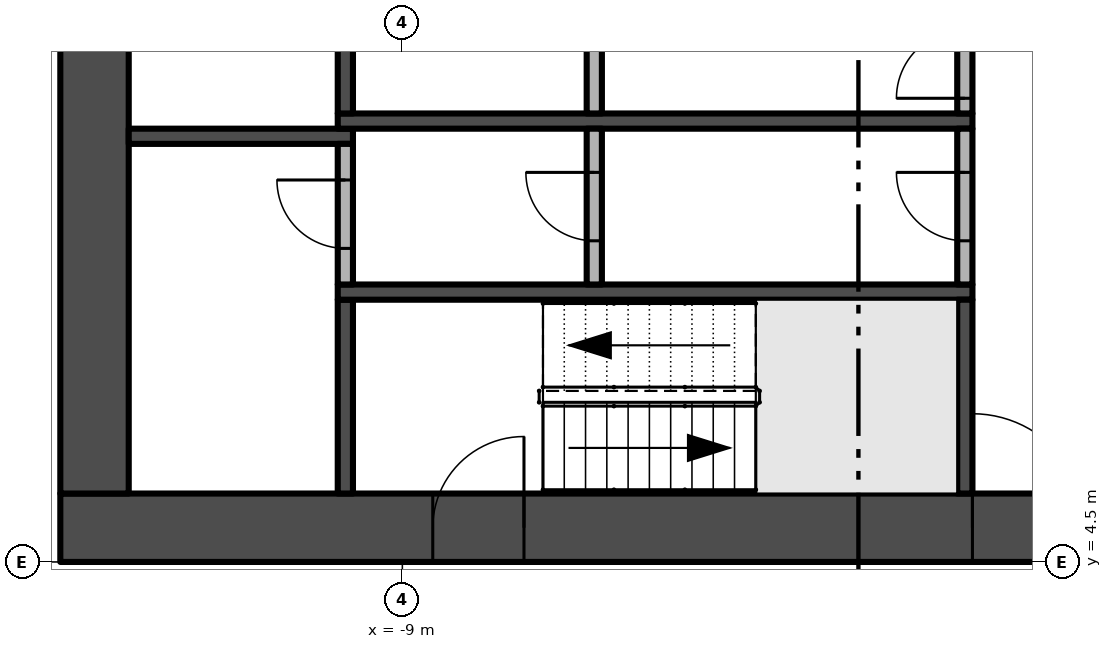
"""IFC4 building model, lengths in metres.
Left out: names, types, materials, properties, quantities, classifications, styles, units other than length and angle.
Written with IfcOpenShell. Run it as: python <this file> out.ifc"""

import sys

from ifc_helpers import new_model, si_unit, direction, frame, frame_2d, origin, place, context, subcontext, project, spatial, rectangle, extrude, element, fill, save


model = new_model("IFC4")
c1 = context("Model", 3, precision=1e-05, world=origin(), true_north=direction((0.0, 1.0)))
c2 = subcontext(c1, "Body", "Model", "MODEL_VIEW")
j1 = project(units=[si_unit("LENGTHUNIT", "METRE"), si_unit("PLANEANGLEUNIT", "RADIAN")], contexts=[c1])
p1 = place(None, origin())
s1 = spatial("IfcSite", under=j1, at=p1, CompositionType="ELEMENT")
p2 = place(p1, origin())
s2 = spatial("IfcBuilding", under=s1, at=p2, CompositionType="ELEMENT")
p3 = place(p2, frame((0.0, 0.0, 92.2)))
s3 = spatial("IfcBuildingStorey", under=s2, at=p3, CompositionType="ELEMENT", Elevation=92.2)
p4 = place(p3, frame((-13.5, 4.95, -0.3), z_axis=(0.0, 0.0, 1.0), x_axis=(1.0, 0.0, 0.0)))
e1 = element("IfcWall", 1, at=p4, inside=s3, PredefinedType="SHEAR", context=c2, shape_type="SweptSolid", body=[
    extrude(rectangle(XDim=27.0, YDim=0.9, at=frame_2d((13.5, 0.0))), origin(), (0.0, 0.0, 1.0), 3.8),
])
p5 = place(p4, frame((12.0, 0.0, 0.3)))
e2 = element("IfcOpeningElement", 2, at=p5, cuts=e1, PredefinedType="OPENING", context=c2, shape_type="SweptSolid", body=[
    extrude(rectangle(XDim=3.0, YDim=2.4, at=frame_2d((1.5, 1.2))), frame((0.0, 0.46, 0.0), z_axis=(0.0, -1.0, 0.0), x_axis=(1.0, 0.0, 0.0)), (0.0, 0.0, 1.0), 0.92),
])
p6 = place(p4, frame((4.9, 0.0, 0.3)))
e3 = element("IfcOpeningElement", 3, at=p6, cuts=e1, PredefinedType="OPENING", context=c2, shape_type="SweptSolid", body=[
    extrude(rectangle(XDim=1.2, YDim=2.2, at=frame_2d((0.6, 1.1))), frame((0.0, 0.46, 0.0), z_axis=(0.0, -1.0, 0.0), x_axis=(1.0, 0.0, 0.0)), (0.0, 0.0, 1.0), 0.92),
])
p7 = place(p4, frame((20.75, 0.0, 0.3)))
e4 = element("IfcOpeningElement", 4, at=p7, cuts=e1, PredefinedType="OPENING", context=c2, shape_type="SweptSolid", body=[
    extrude(rectangle(XDim=1.5, YDim=2.2, at=frame_2d((0.75, 1.1))), frame((0.0, 0.46, 0.0), z_axis=(0.0, -1.0, 0.0), x_axis=(1.0, 0.0, 0.0)), (0.0, 0.0, 1.0), 0.92),
])
p8 = place(p4, frame((17.4, 0.0, 0.3)))
e5 = element("IfcOpeningElement", 5, at=p8, cuts=e1, PredefinedType="OPENING", context=c2, shape_type="SweptSolid", body=[
    extrude(rectangle(XDim=1.2, YDim=2.2, at=frame_2d((0.6, 1.1))), frame((0.0, 0.46, 0.0), z_axis=(0.0, -1.0, 0.0), x_axis=(1.0, 0.0, 0.0)), (0.0, 0.0, 1.0), 0.92),
])
p9 = place(p3, frame((-13.05, 21.6, -0.3), z_axis=(0.0, 0.0, 1.0), x_axis=(0.0, -1.0, 0.0)))
e6 = element("IfcWall", 6, at=p9, inside=s3, PredefinedType="SHEAR", context=c2, shape_type="SweptSolid", body=[
    extrude(rectangle(XDim=16.2, YDim=0.9, at=frame_2d((8.1, 0.0))), origin(), (0.0, 0.0, 1.0), 3.8),
])
p10 = place(p9, frame((9.0, 0.0, 0.3)))
e7 = element("IfcOpeningElement", 7, at=p10, cuts=e6, PredefinedType="OPENING", context=c2, shape_type="SweptSolid", body=[
    extrude(rectangle(XDim=1.2, YDim=2.2, at=frame_2d((0.6, 1.1))), frame((0.0, 0.46, 0.0), z_axis=(0.0, -1.0, 0.0), x_axis=(1.0, 0.0, 0.0)), (0.0, 0.0, 1.0), 0.92),
])
p11 = place(p3, frame((-12.6, 10.1, 0.0), z_axis=(0.0, 0.0, 1.0), x_axis=(1.0, 0.0, 0.0)))
e8 = element("IfcWall", 8, at=p11, inside=s3, PredefinedType="SHEAR", context=c2, shape_type="SweptSolid", body=[
    extrude(rectangle(XDim=2.95, YDim=0.2, at=frame_2d((1.475, 0.0))), origin(), (0.0, 0.0, 1.0), 3.5),
])
p12 = place(p3, frame((-9.75, 5.4, 0.0), z_axis=(0.0, 0.0, 1.0), x_axis=(0.0, 1.0, 0.0)))
e9 = element("IfcWall", 9, at=p12, inside=s3, PredefinedType="SHEAR", context=c2, shape_type="SweptSolid", body=[
    extrude(rectangle(XDim=2.55, YDim=0.2, at=frame_2d((1.275, 0.0))), origin(), (0.0, 0.0, 1.0), 3.5),
])
p13 = place(p3, frame((-9.85, 8.05, 0.0), z_axis=(0.0, 0.0, 1.0), x_axis=(1.0, 0.0, 0.0)))
e10 = element("IfcWall", 10, at=p13, inside=s3, PredefinedType="SHEAR", context=c2, shape_type="SweptSolid", body=[
    extrude(rectangle(XDim=8.35, YDim=0.2, at=frame_2d((4.175, 0.0))), origin(), (0.0, 0.0, 1.0), 3.5),
])
p14 = place(p3, frame((-9.75, 8.15, 0.0), z_axis=(0.0, 0.0, 1.0), x_axis=(0.0, 1.0, 0.0)))
e11 = element("IfcWall", 11, at=p14, inside=s3, PredefinedType="PARTITIONING", context=c2, shape_type="SweptSolid", body=[
    extrude(rectangle(XDim=1.85, YDim=0.2, at=frame_2d((0.925, 0.0))), origin(), (0.0, 0.0, 1.0), 3.5),
])
p15 = place(p14, frame((0.475, 0.0, 0.0)))
e12 = element("IfcOpeningElement", 12, at=p15, cuts=e11, PredefinedType="OPENING", context=c2, shape_type="SweptSolid", body=[
    extrude(rectangle(XDim=0.9, YDim=2.1, at=frame_2d((0.45, 1.05))), frame((0.0, 0.11, 0.0), z_axis=(0.0, -1.0, 0.0), x_axis=(1.0, 0.0, 0.0)), (0.0, 0.0, 1.0), 0.22),
])
p16 = place(p3, frame((-9.85, 10.3, 0.0), z_axis=(0.0, 0.0, 1.0), x_axis=(1.0, 0.0, 0.0)))
e13 = element("IfcWall", 13, at=p16, inside=s3, PredefinedType="SHEAR", context=c2, shape_type="SweptSolid", body=[
    extrude(rectangle(XDim=8.35, YDim=0.2, at=frame_2d((4.175, 0.0))), origin(), (0.0, 0.0, 1.0), 3.5),
])
p17 = place(p3, frame((-9.75, 10.4, 0.0), z_axis=(0.0, 0.0, 1.0), x_axis=(0.0, 1.0, 0.0)))
e14 = element("IfcWall", 14, at=p17, inside=s3, PredefinedType="SHEAR", context=c2, shape_type="SweptSolid", body=[
    extrude(rectangle(XDim=5.5, YDim=0.2, at=frame_2d((2.75, 0.0))), origin(), (0.0, 0.0, 1.0), 3.5),
])
p18 = place(p3, frame((-6.475, 8.15, 0.0), z_axis=(0.0, 0.0, 1.0), x_axis=(0.0, 1.0, 0.0)))
e15 = element("IfcWall", 15, at=p18, inside=s3, PredefinedType="PARTITIONING", context=c2, shape_type="SweptSolid", body=[
    extrude(rectangle(XDim=2.05, YDim=0.2, at=frame_2d((1.025, 0.0))), origin(), (0.0, 0.0, 1.0), 3.5),
])
p19 = place(p18, frame((0.575, 0.0, 0.0)))
e16 = element("IfcOpeningElement", 16, at=p19, cuts=e15, PredefinedType="OPENING", context=c2, shape_type="SweptSolid", body=[
    extrude(rectangle(XDim=0.9, YDim=2.1, at=frame_2d((0.45, 1.05))), frame((0.0, 0.11, 0.0), z_axis=(0.0, -1.0, 0.0), x_axis=(1.0, 0.0, 0.0)), (0.0, 0.0, 1.0), 0.22),
])
p20 = place(p3, frame((-6.475, 10.4, 0.0), z_axis=(0.0, 0.0, 1.0), x_axis=(0.0, 1.0, 0.0)))
e17 = element("IfcWall", 17, at=p20, inside=s3, PredefinedType="PARTITIONING", context=c2, shape_type="SweptSolid", body=[
    extrude(rectangle(XDim=1.35, YDim=0.2, at=frame_2d((0.675, 0.0))), origin(), (0.0, 0.0, 1.0), 3.5),
])
p21 = place(p3, frame((-1.6, 5.4, 0.0), z_axis=(0.0, 0.0, 1.0), x_axis=(0.0, 1.0, 0.0)))
e18 = element("IfcWall", 18, at=p21, inside=s3, PredefinedType="SHEAR", context=c2, shape_type="SweptSolid", body=[
    extrude(rectangle(XDim=2.55, YDim=0.2, at=frame_2d((1.275, 0.0))), origin(), (0.0, 0.0, 1.0), 3.5),
])
p22 = place(p3, frame((-1.6, 8.15, 0.0), z_axis=(0.0, 0.0, 1.0), x_axis=(0.0, 1.0, 0.0)))
e19 = element("IfcWall", 19, at=p22, inside=s3, PredefinedType="PARTITIONING", context=c2, shape_type="SweptSolid", body=[
    extrude(rectangle(XDim=2.05, YDim=0.2, at=frame_2d((1.025, 0.0))), origin(), (0.0, 0.0, 1.0), 3.5),
])
p23 = place(p22, frame((0.575, 0.0, 0.0)))
e20 = element("IfcOpeningElement", 20, at=p23, cuts=e19, PredefinedType="OPENING", context=c2, shape_type="SweptSolid", body=[
    extrude(rectangle(XDim=0.9, YDim=2.1, at=frame_2d((0.45, 1.05))), frame((0.0, 0.11, 0.0), z_axis=(0.0, -1.0, 0.0), x_axis=(1.0, 0.0, 0.0)), (0.0, 0.0, 1.0), 0.22),
])
p24 = place(p3, frame((-1.6, 10.4, 0.0), z_axis=(0.0, 0.0, 1.0), x_axis=(0.0, 1.0, 0.0)))
e21 = element("IfcWall", 21, at=p24, inside=s3, PredefinedType="PARTITIONING", context=c2, shape_type="SweptSolid", body=[
    extrude(rectangle(XDim=1.35, YDim=0.2, at=frame_2d((0.675, 0.0))), origin(), (0.0, 0.0, 1.0), 3.5),
])
p25 = place(p24, frame((0.2, 0.0, 0.0)))
e22 = element("IfcOpeningElement", 22, at=p25, cuts=e21, PredefinedType="OPENING", context=c2, shape_type="SweptSolid", body=[
    extrude(rectangle(XDim=0.9, YDim=2.1, at=frame_2d((0.45, 1.05))), frame((0.0, 0.11, 0.0), z_axis=(0.0, -1.0, 0.0), x_axis=(1.0, 0.0, 0.0)), (0.0, 0.0, 1.0), 0.22),
])
p26 = place(p5, frame((3.0, 0.0, 0.0), z_axis=(0.0, 0.0, 1.0), x_axis=(-1.0, 0.0, 0.0)))
e23 = element("IfcDoor", 23, at=p26, inside=s3, OperationType="DOUBLE_DOOR_SINGLE_SWING", PredefinedType="DOOR", context=c2, shape_type="SweptSolid", body=[
    extrude(rectangle(XDim=3.0, YDim=2.4, at=frame_2d((1.5, 1.2))), frame((0.0, 0.025, 0.0), z_axis=(0.0, -1.0, 0.0), x_axis=(1.0, 0.0, 0.0)), (0.0, 0.0, 1.0), 0.05),
])
fill(e2, e23)
p27 = place(p6, frame((1.2, 0.0, 0.0), z_axis=(0.0, 0.0, 1.0), x_axis=(-1.0, 0.0, 0.0)))
e24 = element("IfcDoor", 24, at=p27, inside=s3, OperationType="SINGLE_SWING_LEFT", PredefinedType="DOOR", context=c2, shape_type="SweptSolid", body=[
    extrude(rectangle(XDim=1.2, YDim=2.2, at=frame_2d((0.6, 1.1))), frame((0.0, 0.025, 0.0), z_axis=(0.0, -1.0, 0.0), x_axis=(1.0, 0.0, 0.0)), (0.0, 0.0, 1.0), 0.05),
])
fill(e3, e24)
p28 = place(p23, origin())
e25 = element("IfcDoor", 25, at=p28, inside=s3, OperationType="SINGLE_SWING_RIGHT", PredefinedType="DOOR", context=c2, shape_type="SweptSolid", body=[
    extrude(rectangle(XDim=0.9, YDim=2.1, at=frame_2d((0.45, 1.05))), frame((0.0, 0.025, 0.0), z_axis=(0.0, -1.0, 0.0), x_axis=(1.0, 0.0, 0.0)), (0.0, 0.0, 1.0), 0.05),
])
fill(e20, e25)
p29 = place(p25, origin())
e26 = element("IfcDoor", 26, at=p29, inside=s3, OperationType="SINGLE_SWING_LEFT", PredefinedType="DOOR", context=c2, shape_type="SweptSolid", body=[
    extrude(rectangle(XDim=0.9, YDim=2.1, at=frame_2d((0.45, 1.05))), frame((0.0, 0.025, 0.0), z_axis=(0.0, -1.0, 0.0), x_axis=(1.0, 0.0, 0.0)), (0.0, 0.0, 1.0), 0.05),
])
fill(e22, e26)
p30 = place(p19, origin())
e27 = element("IfcDoor", 27, at=p30, inside=s3, OperationType="SINGLE_SWING_RIGHT", PredefinedType="DOOR", context=c2, shape_type="SweptSolid", body=[
    extrude(rectangle(XDim=0.9, YDim=2.1, at=frame_2d((0.45, 1.05))), frame((0.0, 0.025, 0.0), z_axis=(0.0, -1.0, 0.0), x_axis=(1.0, 0.0, 0.0)), (0.0, 0.0, 1.0), 0.05),
])
fill(e16, e27)
p31 = place(p15, origin())
e28 = element("IfcDoor", 28, at=p31, inside=s3, OperationType="SINGLE_SWING_RIGHT", PredefinedType="DOOR", context=c2, shape_type="SweptSolid", body=[
    extrude(rectangle(XDim=0.9, YDim=2.1, at=frame_2d((0.45, 1.05))), frame((0.0, 0.025, 0.0), z_axis=(0.0, -1.0, 0.0), x_axis=(1.0, 0.0, 0.0)), (0.0, 0.0, 1.0), 0.05),
])
fill(e12, e28)
save(model, sys.argv[1])
